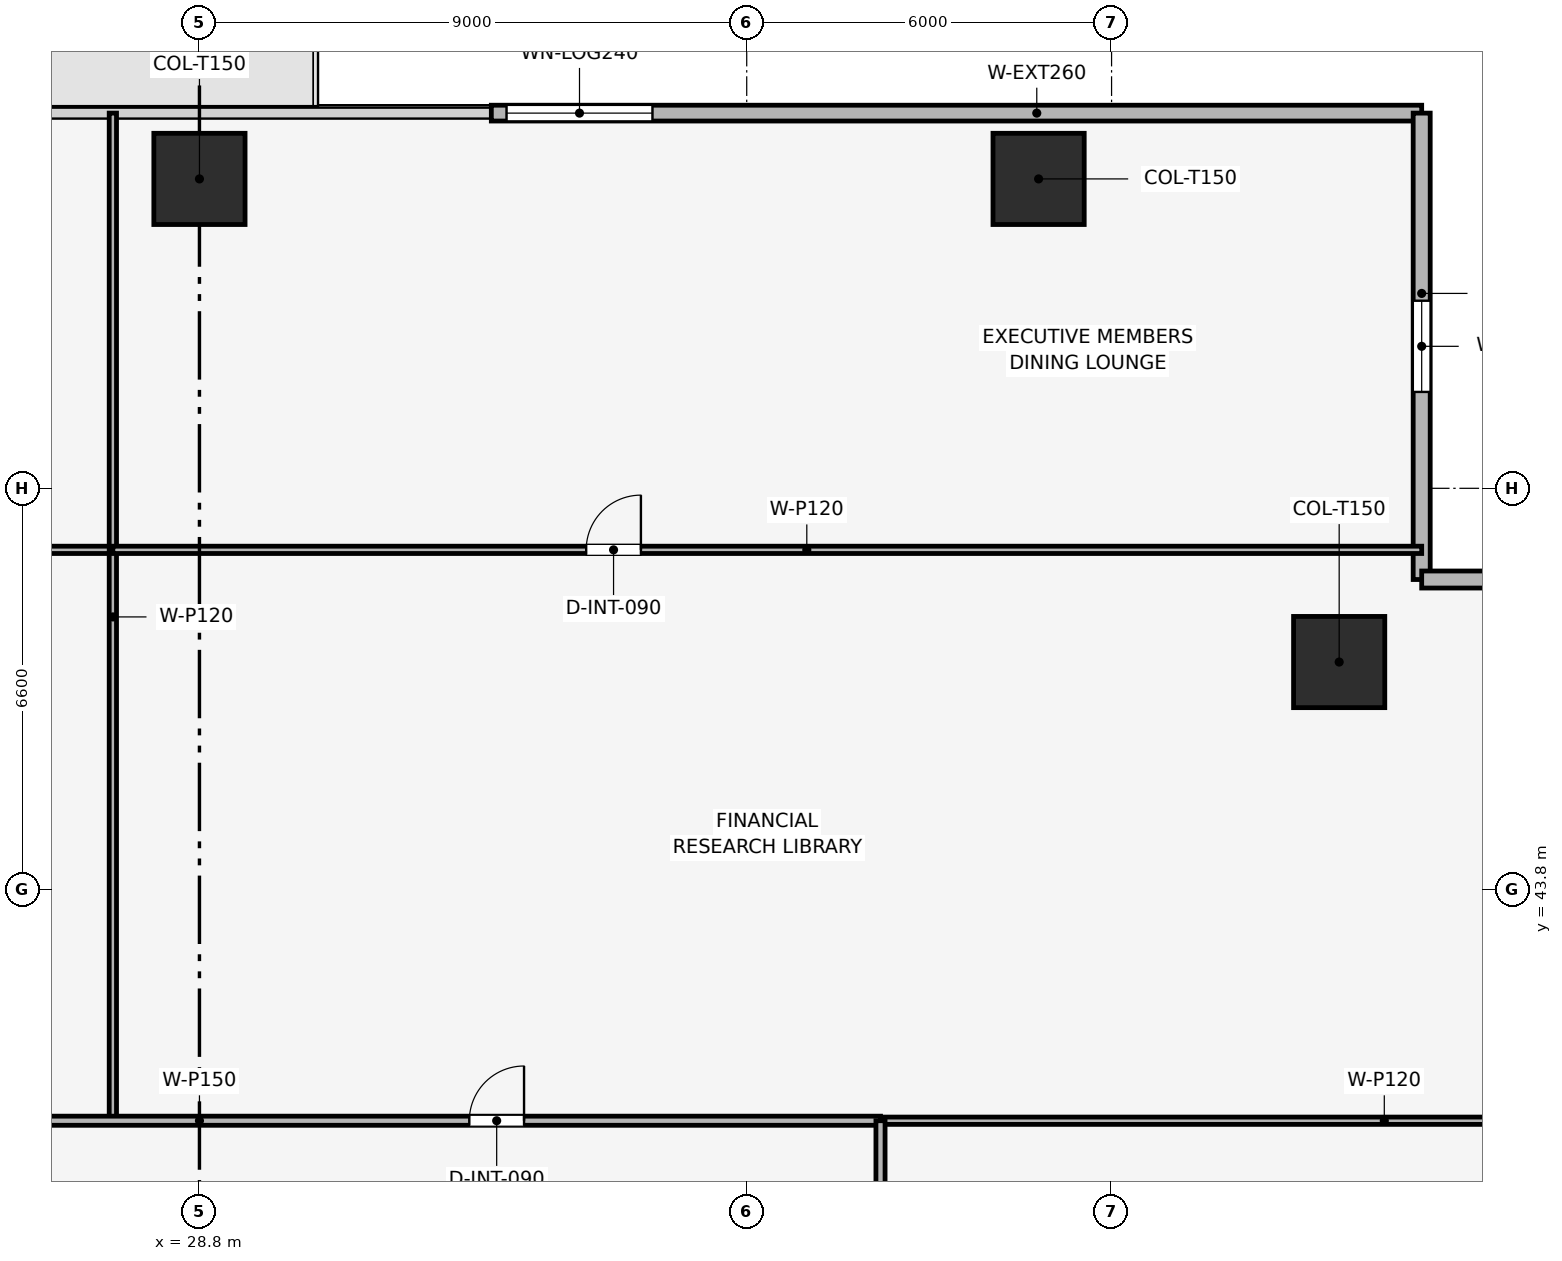
"""IFC4 building model, lengths in metres.
Left out: names, types, materials, properties, quantities, classifications, styles, units other than length and angle.
Written with IfcOpenShell. Run it as: python <this file> out.ifc"""

import sys

from ifc_helpers import new_model, si_unit, direction, frame, frame_2d, origin, origin_2d, place, context, subcontext, project, spatial, rectangle, extrude, element, fill, save


model = new_model("IFC4")
c1 = context("Model", 3, precision=1e-05, world=origin(), true_north=direction((0.0, 1.0)))
c2 = subcontext(c1, "Body", "Model", "MODEL_VIEW")
j1 = project(units=[si_unit("LENGTHUNIT", "METRE"), si_unit("PLANEANGLEUNIT", "RADIAN")], contexts=[c1])
p1 = place(None, origin())
s1 = spatial("IfcSite", under=j1, at=p1, CompositionType="ELEMENT")
p2 = place(p1, origin())
s2 = spatial("IfcBuilding", under=s1, at=p2, CompositionType="ELEMENT")
p3 = place(p2, frame((0.0, 0.0, 104.1)))
s3 = spatial("IfcBuildingStorey", under=s2, at=p3, CompositionType="ELEMENT", Elevation=104.1)
for number, where, z_axis, x_axis in (
    (1, (42.6, 55.488, 0.053), (0.0, -0.225, 0.974), (1.0, 0.0, 0.0)),
    (2, (28.8, 55.488, 0.053), (0.0, -0.225, 0.974), (1.0, 0.0, 0.0)),
):
    element("IfcColumn", number, at=place(p3, frame(where, z_axis=z_axis, x_axis=x_axis)), inside=s3, PredefinedType="COLUMN", context=c2, shape_type="SweptSolid", body=[
        extrude(rectangle(XDim=1.5, YDim=1.5, at=origin_2d()), origin(), (0.0, 0.0, 1.0), 3.575),
    ])
p4 = place(p3, frame((47.543, 47.543, 0.044), z_axis=(-0.150193758483, -0.150193758483, 0.977181492777), x_axis=(0.707106781187, -0.707106781187, 0.0)))
e3 = element("IfcColumn", 3, at=p4, inside=s3, PredefinedType="COLUMN", context=c2, shape_type="SweptSolid", body=[
    extrude(rectangle(XDim=1.5, YDim=1.5, at=origin_2d()), origin(), (0.0, 0.0, 1.0), 3.574),
])
p5 = place(p3, frame((33.6, 56.57, 0.0), z_axis=(0.0, 0.0, 1.0), x_axis=(1.0, 0.0, 0.0)))
e4 = element("IfcWall", 4, at=p5, inside=s3, PredefinedType="SOLIDWALL", context=c2, shape_type="SweptSolid", body=[
    extrude(rectangle(XDim=15.3, YDim=0.26, at=frame_2d((7.65, 0.0))), origin(), (0.0, 0.0, 1.0), 3.54),
])
p6 = place(p5, frame((0.25, 0.0, 0.72)))
e5 = element("IfcOpeningElement", 5, at=p6, cuts=e4, PredefinedType="OPENING", context=c2, shape_type="SweptSolid", body=[
    extrude(rectangle(XDim=2.4, YDim=2.1, at=frame_2d((1.2, 1.05))), frame((0.0, 0.14, 0.0), z_axis=(0.0, -1.0, 0.0), x_axis=(1.0, 0.0, 0.0)), (0.0, 0.0, 1.0), 0.28),
])
p7 = place(p3, frame((48.9, 56.57, 0.0), z_axis=(0.0, 0.0, 1.0), x_axis=(0.0, -1.0, 0.0)))
e6 = element("IfcWall", 6, at=p7, inside=s3, PredefinedType="SOLIDWALL", context=c2, shape_type="SweptSolid", body=[
    extrude(rectangle(XDim=7.67, YDim=0.28, at=frame_2d((3.835, 0.0))), origin(), (0.0, 0.0, 1.0), 3.54),
])
p8 = place(p7, frame((3.085, 0.0, 0.72)))
e7 = element("IfcOpeningElement", 7, at=p8, cuts=e6, PredefinedType="OPENING", context=c2, shape_type="SweptSolid", body=[
    extrude(rectangle(XDim=1.5, YDim=2.2, at=frame_2d((0.75, 1.1))), frame((0.0, 0.15, 0.0), z_axis=(0.0, -1.0, 0.0), x_axis=(1.0, 0.0, 0.0)), (0.0, 0.0, 1.0), 0.3),
])
p9 = place(p3, frame((48.9, 48.9, 0.0), z_axis=(0.0, 0.0, 1.0), x_axis=(1.0, 0.0, 0.0)))
e8 = element("IfcWall", 8, at=p9, inside=s3, PredefinedType="SOLIDWALL", context=c2, shape_type="SweptSolid", body=[
    extrude(rectangle(XDim=7.67, YDim=0.28, at=frame_2d((3.835, 0.0))), origin(), (0.0, 0.0, 1.0), 3.54),
])
p10 = place(p9, frame((3.085, 0.0, 0.72)))
e9 = element("IfcOpeningElement", 9, at=p10, cuts=e8, PredefinedType="OPENING", context=c2, shape_type="SweptSolid", body=[
    extrude(rectangle(XDim=1.5, YDim=2.2, at=frame_2d((0.75, 1.1))), frame((0.0, 0.15, 0.0), z_axis=(0.0, -1.0, 0.0), x_axis=(1.0, 0.0, 0.0)), (0.0, 0.0, 1.0), 0.3),
])
p11 = place(p3, frame((8.7, 49.388, 0.0), z_axis=(0.0, 0.0, 1.0), x_axis=(1.0, 0.0, 0.0)))
e10 = element("IfcWall", 10, at=p11, inside=s3, PredefinedType="PARTITIONING", context=c2, shape_type="SweptSolid", body=[
    extrude(rectangle(XDim=18.676, YDim=0.12, at=frame_2d((9.338, 0.0))), origin(), (0.0, 0.0, 1.0), 2.825),
])
p12 = place(p11, frame((12.508, 0.0, 0.0)))
e11 = element("IfcOpeningElement", 11, at=p12, cuts=e10, PredefinedType="OPENING", context=c2, shape_type="SweptSolid", body=[
    extrude(rectangle(XDim=0.9, YDim=2.1, at=frame_2d((0.45, 1.05))), frame((0.0, 0.07, 0.0), z_axis=(0.0, -1.0, 0.0), x_axis=(1.0, 0.0, 0.0)), (0.0, 0.0, 1.0), 0.14),
])
p13 = place(p3, frame((27.376, 40.0, 0.0), z_axis=(0.0, 0.0, 1.0), x_axis=(0.0, 1.0, 0.0)))
e12 = element("IfcWall", 12, at=p13, inside=s3, PredefinedType="PARTITIONING", context=c2, shape_type="SweptSolid", body=[
    extrude(rectangle(XDim=16.57, YDim=0.12, at=frame_2d((8.285, 0.0))), origin(), (0.0, 0.0, 1.0), 2.825),
])
p14 = place(p3, frame((27.376, 49.388, 0.0), z_axis=(0.0, 0.0, 1.0), x_axis=(1.0, 0.0, 0.0)))
e13 = element("IfcWall", 13, at=p14, inside=s3, PredefinedType="PARTITIONING", context=c2, shape_type="SweptSolid", body=[
    extrude(rectangle(XDim=21.524, YDim=0.12, at=frame_2d((10.762, 0.0))), origin(), (0.0, 0.0, 1.0), 2.825),
])
p15 = place(p14, frame((7.784, 0.0, 0.0)))
e14 = element("IfcOpeningElement", 14, at=p15, cuts=e13, PredefinedType="OPENING", context=c2, shape_type="SweptSolid", body=[
    extrude(rectangle(XDim=0.9, YDim=2.1, at=frame_2d((0.45, 1.05))), frame((0.0, 0.07, 0.0), z_axis=(0.0, -1.0, 0.0), x_axis=(1.0, 0.0, 0.0)), (0.0, 0.0, 1.0), 0.14),
])
p16 = place(p3, frame((40.0, 40.0, 0.0), z_axis=(0.0, 0.0, 1.0), x_axis=(1.0, 0.0, 0.0)))
e15 = element("IfcWall", 15, at=p16, inside=s3, PredefinedType="PARTITIONING", context=c2, shape_type="SweptSolid", body=[
    extrude(rectangle(XDim=16.57, YDim=0.12, at=frame_2d((8.285, 0.0))), origin(), (0.0, 0.0, 1.0), 2.825),
])
p17 = place(p3, frame((17.6, 40.0, 0.0), z_axis=(0.0, 0.0, 1.0), x_axis=(1.0, 0.0, 0.0)))
e16 = element("IfcWall", 16, at=p17, inside=s3, PredefinedType="PARTITIONING", context=c2, shape_type="SweptSolid", body=[
    extrude(rectangle(XDim=22.4, YDim=0.15, at=frame_2d((11.2, 0.0))), origin(), (0.0, 0.0, 1.0), 2.975),
])
p18 = place(p17, frame((4.438, 0.0, 0.0)))
e17 = element("IfcOpeningElement", 17, at=p18, cuts=e16, PredefinedType="OPENING", context=c2, shape_type="SweptSolid", body=[
    extrude(rectangle(XDim=0.9, YDim=2.1, at=frame_2d((0.45, 1.05))), frame((0.0, 0.085, 0.0), z_axis=(0.0, -1.0, 0.0), x_axis=(1.0, 0.0, 0.0)), (0.0, 0.0, 1.0), 0.17),
])
p19 = place(p17, frame((15.638, 0.0, 0.0)))
e18 = element("IfcOpeningElement", 18, at=p19, cuts=e16, PredefinedType="OPENING", context=c2, shape_type="SweptSolid", body=[
    extrude(rectangle(XDim=0.9, YDim=2.1, at=frame_2d((0.45, 1.05))), frame((0.0, 0.085, 0.0), z_axis=(0.0, -1.0, 0.0), x_axis=(1.0, 0.0, 0.0)), (0.0, 0.0, 1.0), 0.17),
])
p20 = place(p3, frame((40.0, 17.6, 0.0), z_axis=(0.0, 0.0, 1.0), x_axis=(0.0, 1.0, 0.0)))
e19 = element("IfcWall", 19, at=p20, inside=s3, PredefinedType="PARTITIONING", context=c2, shape_type="SweptSolid", body=[
    extrude(rectangle(XDim=22.4, YDim=0.15, at=frame_2d((11.2, 0.0))), origin(), (0.0, 0.0, 1.0), 2.975),
])
p21 = place(p20, frame((0.7, 0.0, 0.0)))
e20 = element("IfcOpeningElement", 20, at=p21, cuts=e19, PredefinedType="OPENING", context=c2, shape_type="SweptSolid", body=[
    extrude(rectangle(XDim=0.9, YDim=2.1, at=frame_2d((0.45, 1.05))), frame((0.0, 0.085, 0.0), z_axis=(0.0, -1.0, 0.0), x_axis=(1.0, 0.0, 0.0)), (0.0, 0.0, 1.0), 0.17),
])
p22 = place(p20, frame((4.927, 0.0, 0.0)))
e21 = element("IfcOpeningElement", 21, at=p22, cuts=e19, PredefinedType="OPENING", context=c2, shape_type="SweptSolid", body=[
    extrude(rectangle(XDim=0.9, YDim=2.1, at=frame_2d((0.45, 1.05))), frame((0.0, 0.085, 0.0), z_axis=(0.0, -1.0, 0.0), x_axis=(1.0, 0.0, 0.0)), (0.0, 0.0, 1.0), 0.17),
])
p23 = place(p20, frame((10.886, 0.0, 0.0)))
e22 = element("IfcOpeningElement", 22, at=p23, cuts=e19, PredefinedType="OPENING", context=c2, shape_type="SweptSolid", body=[
    extrude(rectangle(XDim=0.9, YDim=2.1, at=frame_2d((0.45, 1.05))), frame((0.0, 0.085, 0.0), z_axis=(0.0, -1.0, 0.0), x_axis=(1.0, 0.0, 0.0)), (0.0, 0.0, 1.0), 0.17),
])
p24 = place(p20, frame((17.859, 0.0, 0.0)))
e23 = element("IfcOpeningElement", 23, at=p24, cuts=e19, PredefinedType="OPENING", context=c2, shape_type="SweptSolid", body=[
    extrude(rectangle(XDim=0.9, YDim=2.1, at=frame_2d((0.45, 1.05))), frame((0.0, 0.085, 0.0), z_axis=(0.0, -1.0, 0.0), x_axis=(1.0, 0.0, 0.0)), (0.0, 0.0, 1.0), 0.17),
])
p25 = place(p6, origin())
e24 = element("IfcWindow", 24, at=p25, inside=s3, PartitioningType="SINGLE_PANEL", PredefinedType="WINDOW", context=c2, shape_type="SweptSolid", body=[
    extrude(rectangle(XDim=2.4, YDim=2.1, at=frame_2d((1.2, 1.05))), frame((0.0, 0.03, 0.0), z_axis=(0.0, -1.0, 0.0), x_axis=(1.0, 0.0, 0.0)), (0.0, 0.0, 1.0), 0.06),
])
fill(e5, e24)
p26 = place(p8, origin())
e25 = element("IfcWindow", 25, at=p26, inside=s3, PartitioningType="SINGLE_PANEL", PredefinedType="WINDOW", context=c2, shape_type="SweptSolid", body=[
    extrude(rectangle(XDim=1.5, YDim=2.2, at=frame_2d((0.75, 1.1))), frame((0.0, 0.03, 0.0), z_axis=(0.0, -1.0, 0.0), x_axis=(1.0, 0.0, 0.0)), (0.0, 0.0, 1.0), 0.06),
])
fill(e7, e25)
p27 = place(p15, origin())
e26 = element("IfcDoor", 26, at=p27, inside=s3, OperationType="SINGLE_SWING_RIGHT", PredefinedType="DOOR", context=c2, shape_type="SweptSolid", body=[
    extrude(rectangle(XDim=0.9, YDim=2.1, at=frame_2d((0.45, 1.05))), frame((0.0, 0.025, 0.0), z_axis=(0.0, -1.0, 0.0), x_axis=(1.0, 0.0, 0.0)), (0.0, 0.0, 1.0), 0.05),
])
fill(e14, e26)
p28 = place(p19, origin())
e27 = element("IfcDoor", 27, at=p28, inside=s3, OperationType="SINGLE_SWING_RIGHT", PredefinedType="DOOR", context=c2, shape_type="SweptSolid", body=[
    extrude(rectangle(XDim=0.9, YDim=2.1, at=frame_2d((0.45, 1.05))), frame((0.0, 0.025, 0.0), z_axis=(0.0, -1.0, 0.0), x_axis=(1.0, 0.0, 0.0)), (0.0, 0.0, 1.0), 0.05),
])
fill(e18, e27)
save(model, sys.argv[1])
